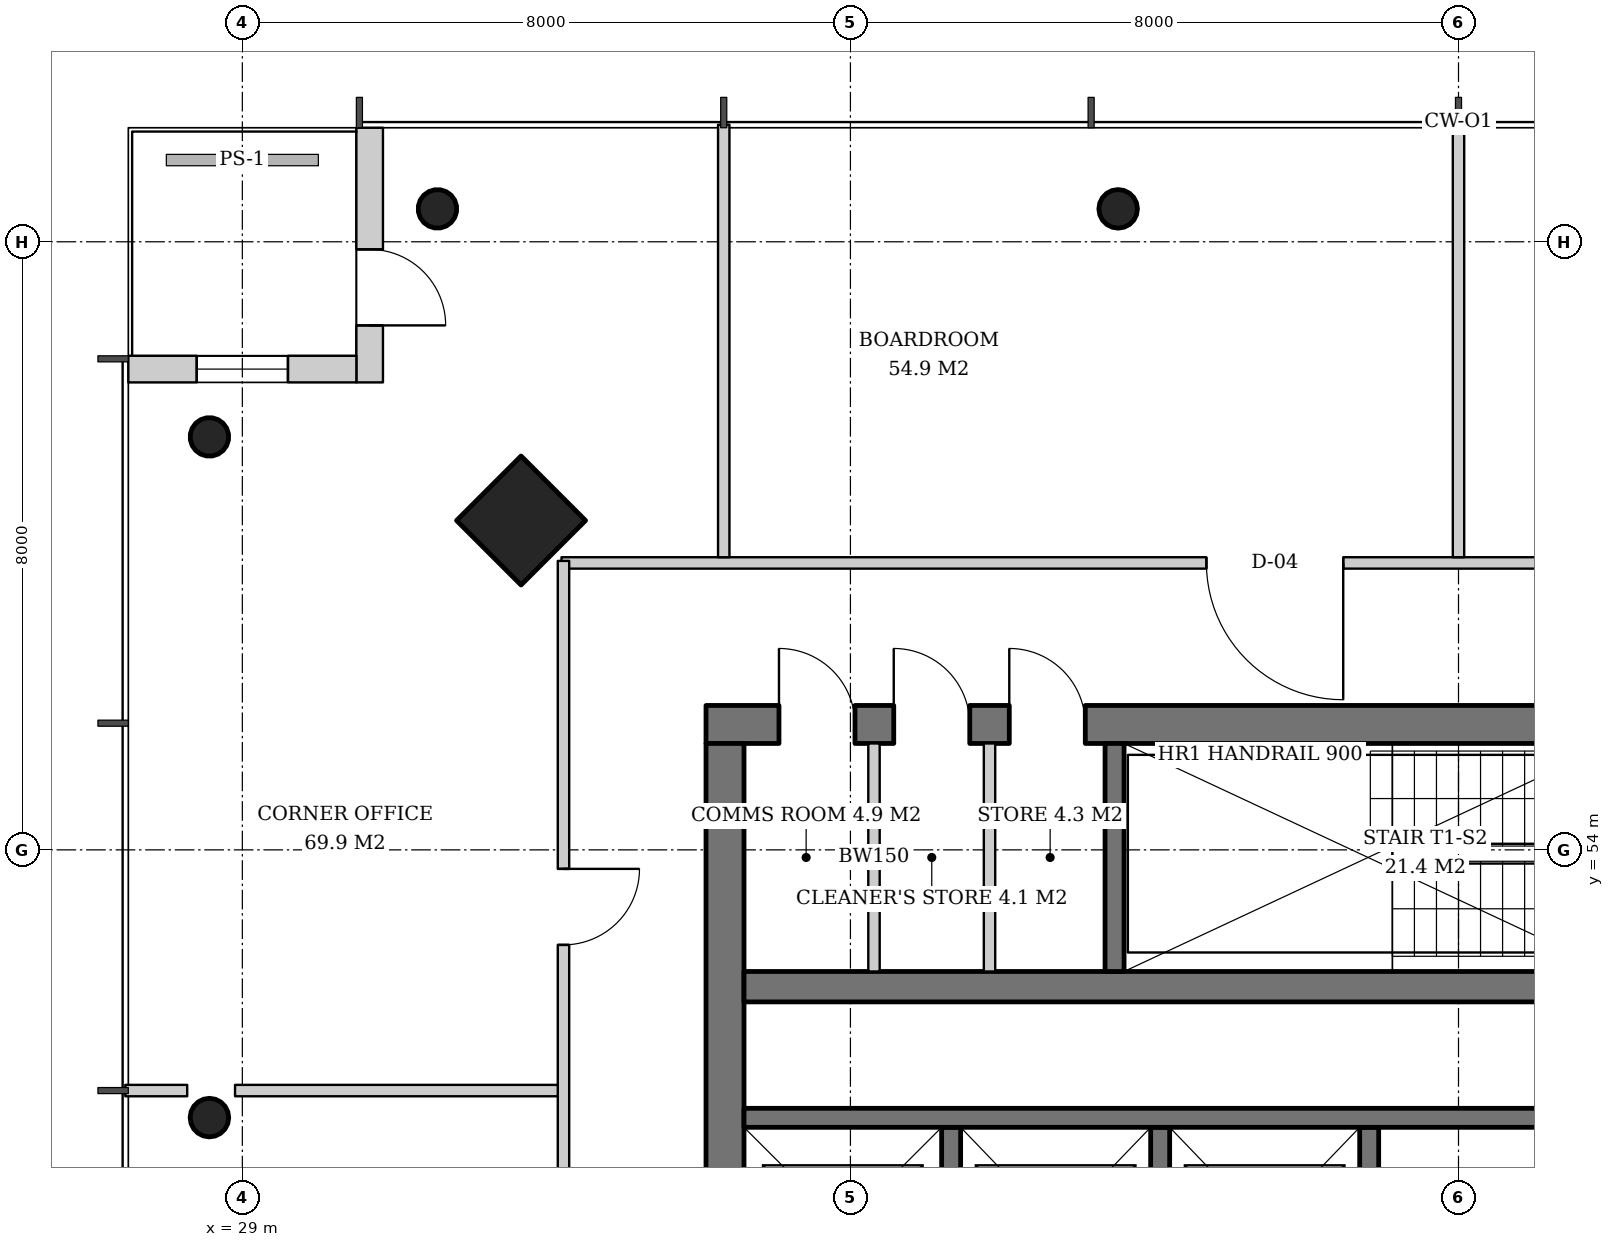
"""IFC4 building model, lengths in metres.
Left out: names, types, materials, properties, quantities, classifications, styles, units other than length and angle.
Written with IfcOpenShell. Run it as: python <this file> out.ifc"""

import sys

from ifc_helpers import new_model, si_unit, direction, frame, frame_2d, origin, origin_2d, place, context, subcontext, project, spatial, rectangle, hollow_circle, extrude, element, fill, save


model = new_model("IFC4")
c1 = context("Model", 3, precision=1e-05, world=origin(), true_north=direction((0.0, 1.0)))
c2 = subcontext(c1, "Body", "Model", "MODEL_VIEW")
j1 = project(units=[si_unit("LENGTHUNIT", "METRE"), si_unit("PLANEANGLEUNIT", "RADIAN")], contexts=[c1])
p1 = place(None, origin())
s1 = spatial("IfcSite", under=j1, at=p1, CompositionType="ELEMENT")
p2 = place(p1, origin())
s2 = spatial("IfcBuilding", under=s1, at=p2, CompositionType="ELEMENT")
p3 = place(p2, frame((0.0, 0.0, 256.6)))
s3 = spatial("IfcBuildingStorey", under=s2, at=p3, CompositionType="ELEMENT", Elevation=256.6)
p4 = place(p3, frame((32.629, 58.371, 0.0), z_axis=(0.031900153262, -0.031900153262, 0.998981861919), x_axis=(0.707106781187, 0.707106781187, 0.0)))
e1 = element("IfcColumn", 1, at=p4, inside=s3, PredefinedType="COLUMN", context=c2, shape_type="SweptSolid", body=[
    extrude(rectangle(XDim=1.2, YDim=1.2, at=origin_2d()), origin(), (0.0, 0.0, 1.0), 3.804),
])
p5 = place(p3, frame((31.529, 62.471, 0.0), z_axis=(0.031900153262, -0.031900153262, 0.998981861919), x_axis=(0.707106781187, 0.707106781187, 0.0)))
e2 = element("IfcColumn", 2, at=p5, inside=s3, PredefinedType="COLUMN", context=c2, shape_type="SweptSolid", body=[
    extrude(hollow_circle(Radius=0.254, WallThickness=0.02, at=origin_2d()), origin(), (0.0, 0.0, 1.0), 3.804),
])
p6 = place(p3, frame((40.51, 62.471, 0.0), z_axis=(0.010659599298, -0.031914583439, 0.999433755837), x_axis=(0.948492281772, 0.316800238982, 0.0)))
e3 = element("IfcColumn", 3, at=p6, inside=s3, PredefinedType="COLUMN", context=c2, shape_type="SweptSolid", body=[
    extrude(hollow_circle(Radius=0.254, WallThickness=0.02, at=origin_2d()), origin(), (0.0, 0.0, 1.0), 3.802),
])
p7 = place(p3, frame((28.529, 59.471, 0.0), z_axis=(0.031900153262, -0.031900153262, 0.998981861919), x_axis=(0.707106781187, 0.707106781187, 0.0)))
e4 = element("IfcColumn", 4, at=p7, inside=s3, PredefinedType="COLUMN", context=c2, shape_type="SweptSolid", body=[
    extrude(hollow_circle(Radius=0.254, WallThickness=0.02, at=origin_2d()), origin(), (0.0, 0.0, 1.0), 3.804),
])
p8 = place(p3, frame((28.529, 50.49, 0.0), z_axis=(0.031914583439, -0.010659599298, 0.999433755837), x_axis=(0.316800238982, 0.948492281772, 0.0)))
e5 = element("IfcColumn", 5, at=p8, inside=s3, PredefinedType="COLUMN", context=c2, shape_type="SweptSolid", body=[
    extrude(hollow_circle(Radius=0.254, WallThickness=0.02, at=origin_2d()), origin(), (0.0, 0.0, 1.0), 3.802),
])
p9 = place(p3, frame((35.1, 55.65, 0.0), z_axis=(0.0, 0.0, 1.0), x_axis=(1.0, 0.0, 0.0)))
e6 = element("IfcWall", 6, at=p9, inside=s3, PredefinedType="SHEAR", context=c2, shape_type="SweptSolid", body=[
    extrude(rectangle(XDim=19.8, YDim=0.5, at=frame_2d((9.9, 0.0))), origin(), (0.0, 0.0, 1.0), 3.8),
])
p10 = place(p9, frame((14.54, 0.0, 0.0)))
e7 = element("IfcOpeningElement", 7, at=p10, cuts=e6, PredefinedType="OPENING", context=c2, shape_type="SweptSolid", body=[
    extrude(rectangle(XDim=1.0, YDim=2.1, at=frame_2d((0.5, 1.05))), frame((0.0, 0.26, 0.0), z_axis=(0.0, -1.0, 0.0), x_axis=(1.0, 0.0, 0.0)), (0.0, 0.0, 1.0), 0.52),
])
p11 = place(p9, frame((0.96, 0.0, 0.0)))
e8 = element("IfcOpeningElement", 8, at=p11, cuts=e6, PredefinedType="OPENING", context=c2, shape_type="SweptSolid", body=[
    extrude(rectangle(XDim=1.0, YDim=2.1, at=frame_2d((0.5, 1.05))), frame((0.0, 0.26, 0.0), z_axis=(0.0, -1.0, 0.0), x_axis=(1.0, 0.0, 0.0)), (0.0, 0.0, 1.0), 0.52),
])
p12 = place(p9, frame((2.47, 0.0, 0.0)))
e9 = element("IfcOpeningElement", 9, at=p12, cuts=e6, PredefinedType="OPENING", context=c2, shape_type="SweptSolid", body=[
    extrude(rectangle(XDim=1.0, YDim=2.1, at=frame_2d((0.5, 1.05))), frame((0.0, 0.26, 0.0), z_axis=(0.0, -1.0, 0.0), x_axis=(1.0, 0.0, 0.0)), (0.0, 0.0, 1.0), 0.52),
])
p13 = place(p9, frame((3.99, 0.0, 0.0)))
e10 = element("IfcOpeningElement", 10, at=p13, cuts=e6, PredefinedType="OPENING", context=c2, shape_type="SweptSolid", body=[
    extrude(rectangle(XDim=1.0, YDim=2.1, at=frame_2d((0.5, 1.05))), frame((0.0, 0.26, 0.0), z_axis=(0.0, -1.0, 0.0), x_axis=(1.0, 0.0, 0.0)), (0.0, 0.0, 1.0), 0.52),
])
p14 = place(p3, frame((35.35, 36.6, 0.0), z_axis=(0.0, 0.0, 1.0), x_axis=(0.0, 1.0, 0.0)))
e11 = element("IfcWall", 11, at=p14, inside=s3, PredefinedType="SHEAR", context=c2, shape_type="SweptSolid", body=[
    extrude(rectangle(XDim=18.8, YDim=0.5, at=frame_2d((9.4, 0.0))), origin(), (0.0, 0.0, 1.0), 3.8),
])
p15 = place(p14, frame((8.5, 0.0, 0.0)))
e12 = element("IfcOpeningElement", 12, at=p15, cuts=e11, PredefinedType="OPENING", context=c2, shape_type="SweptSolid", body=[
    extrude(rectangle(XDim=1.8, YDim=2.4, at=frame_2d((0.9, 1.2))), frame((0.0, 0.26, 0.0), z_axis=(0.0, -1.0, 0.0), x_axis=(1.0, 0.0, 0.0)), (0.0, 0.0, 1.0), 0.52),
])
p16 = place(p3, frame((35.6, 52.2, 0.0), z_axis=(0.0, 0.0, 1.0), x_axis=(1.0, 0.0, 0.0)))
e13 = element("IfcWall", 13, at=p16, inside=s3, PredefinedType="SHEAR", context=c2, shape_type="SweptSolid", body=[
    extrude(rectangle(XDim=18.8, YDim=0.4, at=frame_2d((9.4, 0.0))), origin(), (0.0, 0.0, 1.0), 3.8),
])
p17 = place(p3, frame((30.675, 63.5, 0.0), z_axis=(0.0, 0.0, 1.0), x_axis=(0.0, -1.0, 0.0)))
e14 = element("IfcWall", 14, at=p17, inside=s3, PredefinedType="SOLIDWALL", context=c2, shape_type="SweptSolid", body=[
    extrude(rectangle(XDim=3.35, YDim=0.35, at=frame_2d((1.675, 0.0))), origin(), (0.0, 0.0, 1.0), 3.62),
])
p18 = place(p17, frame((1.6, 0.0, 0.0)))
e15 = element("IfcOpeningElement", 15, at=p18, cuts=e14, PredefinedType="OPENING", context=c2, shape_type="SweptSolid", body=[
    extrude(rectangle(XDim=1.0, YDim=2.4, at=frame_2d((0.5, 1.2))), frame((0.0, 0.185, 0.0), z_axis=(0.0, -1.0, 0.0), x_axis=(1.0, 0.0, 0.0)), (0.0, 0.0, 1.0), 0.37),
])
p19 = place(p3, frame((30.5, 60.325, 0.0), z_axis=(0.0, 0.0, 1.0), x_axis=(-1.0, 0.0, 0.0)))
e16 = element("IfcWall", 16, at=p19, inside=s3, PredefinedType="SOLIDWALL", context=c2, shape_type="SweptSolid", body=[
    extrude(rectangle(XDim=3.0, YDim=0.35, at=frame_2d((1.5, 0.0))), origin(), (0.0, 0.0, 1.0), 3.62),
])
p20 = place(p19, frame((0.9, 0.0, 0.6)))
e17 = element("IfcOpeningElement", 17, at=p20, cuts=e16, PredefinedType="OPENING", context=c2, shape_type="SweptSolid", body=[
    extrude(rectangle(XDim=1.2, YDim=2.55, at=frame_2d((0.6, 1.275))), frame((0.0, 0.185, 0.0), z_axis=(0.0, -1.0, 0.0), x_axis=(1.0, 0.0, 0.0)), (0.0, 0.0, 1.0), 0.37),
])
p21 = place(p3, frame((40.475, 52.4, 0.0), z_axis=(0.0, 0.0, 1.0), x_axis=(0.0, 1.0, 0.0)))
e18 = element("IfcWall", 18, at=p21, inside=s3, PredefinedType="SHEAR", context=c2, shape_type="SweptSolid", body=[
    extrude(rectangle(XDim=3.0, YDim=0.25, at=frame_2d((1.5, 0.0))), origin(), (0.0, 0.0, 1.0), 3.8),
])
for number, where, z_axis, x_axis in (
    (19, (38.325, 47.75, 0.0), (0.0, 0.0, 1.0), (0.0, 1.0, 0.0)),
    (20, (41.075, 47.75, 0.0), (0.0, 0.0, 1.0), (0.0, 1.0, 0.0)),
    (21, (43.825, 47.75, 0.0), (0.0, 0.0, 1.0), (0.0, 1.0, 0.0)),
):
    element("IfcWall", number, at=place(p3, frame(where, z_axis=z_axis, x_axis=x_axis)), inside=s3, PredefinedType="SHEAR", context=c2, shape_type="SweptSolid", body=[
        extrude(rectangle(XDim=2.6, YDim=0.25, at=frame_2d((1.3, 0.0))), origin(), (0.0, 0.0, 1.0), 3.8),
    ])
p22 = place(p3, frame((35.6, 50.475, 0.0), z_axis=(0.0, 0.0, 1.0), x_axis=(1.0, 0.0, 0.0)))
e22 = element("IfcWall", 22, at=p22, inside=s3, PredefinedType="SHEAR", context=c2, shape_type="SweptSolid", body=[
    extrude(rectangle(XDim=11.1, YDim=0.25, at=frame_2d((5.55, 0.0))), origin(), (0.0, 0.0, 1.0), 3.8),
])
for number, where, z_axis, x_axis in (
    (23, (37.31, 52.4, 0.0), (0.0, 0.0, 1.0), (0.0, 1.0, 0.0)),
    (24, (38.83, 52.4, 0.0), (0.0, 0.0, 1.0), (0.0, 1.0, 0.0)),
):
    element("IfcWall", number, at=place(p3, frame(where, z_axis=z_axis, x_axis=x_axis)), inside=s3, PredefinedType="SOLIDWALL", context=c2, shape_type="SweptSolid", body=[
        extrude(rectangle(XDim=3.0, YDim=0.15, at=frame_2d((1.5, 0.0))), origin(), (0.0, 0.0, 1.0), 3.62),
    ])
p23 = place(p3, frame((56.802, 57.775, 0.0), z_axis=(0.0, 0.0, 1.0), x_axis=(-1.0, 0.0, 0.0)))
e25 = element("IfcWall", 25, at=p23, inside=s3, PredefinedType="PARTITIONING", context=c2, shape_type="SweptSolid", body=[
    extrude(rectangle(XDim=23.603, YDim=0.15, at=frame_2d((11.802, 0.0))), origin(), (0.0, 0.0, 1.0), 3.02),
])
p24 = place(p23, frame((4.052, 0.0, 0.0)))
e26 = element("IfcOpeningElement", 26, at=p24, cuts=e25, PredefinedType="OPENING", context=c2, shape_type="SweptSolid", body=[
    extrude(rectangle(XDim=1.0, YDim=2.1, at=frame_2d((0.5, 1.05))), frame((0.0, 0.085, 0.0), z_axis=(0.0, -1.0, 0.0), x_axis=(1.0, 0.0, 0.0)), (0.0, 0.0, 1.0), 0.17),
])
p25 = place(p23, frame((8.885, 0.0, 0.0)))
e27 = element("IfcOpeningElement", 27, at=p25, cuts=e25, PredefinedType="OPENING", context=c2, shape_type="SweptSolid", body=[
    extrude(rectangle(XDim=1.0, YDim=2.1, at=frame_2d((0.5, 1.05))), frame((0.0, 0.085, 0.0), z_axis=(0.0, -1.0, 0.0), x_axis=(1.0, 0.0, 0.0)), (0.0, 0.0, 1.0), 0.17),
])
p26 = place(p23, frame((13.318, 0.0, 0.0)))
e28 = element("IfcOpeningElement", 28, at=p26, cuts=e25, PredefinedType="OPENING", context=c2, shape_type="SweptSolid", body=[
    extrude(rectangle(XDim=1.8, YDim=2.4, at=frame_2d((0.9, 1.2))), frame((0.0, 0.085, 0.0), z_axis=(0.0, -1.0, 0.0), x_axis=(1.0, 0.0, 0.0)), (0.0, 0.0, 1.0), 0.17),
])
for number, where, z_axis, x_axis in (
    (29, (45.0, 57.85, 0.0), (0.0, 0.0, 1.0), (0.0, 1.0, 0.0)),
    (30, (35.333, 57.85, 0.0), (0.0, 0.0, 1.0), (0.0, 1.0, 0.0)),
):
    element("IfcWall", number, at=place(p3, frame(where, z_axis=z_axis, x_axis=x_axis)), inside=s3, PredefinedType="PARTITIONING", context=c2, shape_type="SweptSolid", body=[
        extrude(rectangle(XDim=5.69, YDim=0.15, at=frame_2d((2.845, 0.0))), origin(), (0.0, 0.0, 1.0), 3.12),
    ])
p27 = place(p3, frame((33.225, 57.802, 0.0), z_axis=(0.0, 0.0, 1.0), x_axis=(0.0, -1.0, 0.0)))
e31 = element("IfcWall", 31, at=p27, inside=s3, PredefinedType="PARTITIONING", context=c2, shape_type="SweptSolid", body=[
    extrude(rectangle(XDim=23.603, YDim=0.15, at=frame_2d((11.802, 0.0))), origin(), (0.0, 0.0, 1.0), 3.02),
])
p28 = place(p27, frame((4.052, 0.0, 0.0)))
e32 = element("IfcOpeningElement", 32, at=p28, cuts=e31, PredefinedType="OPENING", context=c2, shape_type="SweptSolid", body=[
    extrude(rectangle(XDim=1.0, YDim=2.1, at=frame_2d((0.5, 1.05))), frame((0.0, 0.085, 0.0), z_axis=(0.0, -1.0, 0.0), x_axis=(1.0, 0.0, 0.0)), (0.0, 0.0, 1.0), 0.17),
])
p29 = place(p27, frame((8.985, 0.0, 0.0)))
e33 = element("IfcOpeningElement", 33, at=p29, cuts=e31, PredefinedType="OPENING", context=c2, shape_type="SweptSolid", body=[
    extrude(rectangle(XDim=0.8, YDim=2.1, at=frame_2d((0.4, 1.05))), frame((0.0, 0.085, 0.0), z_axis=(0.0, -1.0, 0.0), x_axis=(1.0, 0.0, 0.0)), (0.0, 0.0, 1.0), 0.17),
])
p30 = place(p27, frame((13.718, 0.0, 0.0)))
e34 = element("IfcOpeningElement", 34, at=p30, cuts=e31, PredefinedType="OPENING", context=c2, shape_type="SweptSolid", body=[
    extrude(rectangle(XDim=1.0, YDim=2.1, at=frame_2d((0.5, 1.05))), frame((0.0, 0.085, 0.0), z_axis=(0.0, -1.0, 0.0), x_axis=(1.0, 0.0, 0.0)), (0.0, 0.0, 1.0), 0.17),
])
p31 = place(p27, frame((18.651, 0.0, 0.0)))
e35 = element("IfcOpeningElement", 35, at=p31, cuts=e31, PredefinedType="OPENING", context=c2, shape_type="SweptSolid", body=[
    extrude(rectangle(XDim=0.8, YDim=2.1, at=frame_2d((0.4, 1.05))), frame((0.0, 0.085, 0.0), z_axis=(0.0, -1.0, 0.0), x_axis=(1.0, 0.0, 0.0)), (0.0, 0.0, 1.0), 0.17),
])
p32 = place(p3, frame((33.15, 50.833, 0.0), z_axis=(0.0, 0.0, 1.0), x_axis=(-1.0, 0.0, 0.0)))
e36 = element("IfcWall", 36, at=p32, inside=s3, PredefinedType="PARTITIONING", context=c2, shape_type="SweptSolid", body=[
    extrude(rectangle(XDim=4.246, YDim=0.15, at=frame_2d((2.123, 0.0))), origin(), (0.0, 0.0, 1.0), 3.62),
])
p33 = place(p3, frame((28.275, 50.833, 0.0), z_axis=(0.0, 0.0, 1.0), x_axis=(-1.0, 0.0, 0.0)))
e37 = element("IfcWall", 37, at=p33, inside=s3, PredefinedType="PARTITIONING", context=c2, shape_type="SweptSolid", body=[
    extrude(rectangle(XDim=0.815, YDim=0.15, at=frame_2d((0.407, 0.0))), origin(), (0.0, 0.0, 1.0), 3.62),
])
p34 = place(p18, origin())
e38 = element("IfcDoor", 38, at=p34, inside=s3, OperationType="SINGLE_SWING_RIGHT", PredefinedType="DOOR", context=c2, shape_type="SweptSolid", body=[
    extrude(rectangle(XDim=1.0, YDim=2.4, at=frame_2d((0.5, 1.2))), frame((0.0, 0.025, 0.0), z_axis=(0.0, -1.0, 0.0), x_axis=(1.0, 0.0, 0.0)), (0.0, 0.0, 1.0), 0.05),
])
fill(e15, e38)
p35 = place(p20, origin())
e39 = element("IfcWindow", 39, at=p35, inside=s3, PartitioningType="SINGLE_PANEL", PredefinedType="WINDOW", context=c2, shape_type="SweptSolid", body=[
    extrude(rectangle(XDim=1.2, YDim=2.55, at=frame_2d((0.6, 1.275))), frame((0.0, 0.03, 0.0), z_axis=(0.0, -1.0, 0.0), x_axis=(1.0, 0.0, 0.0)), (0.0, 0.0, 1.0), 0.06),
])
fill(e17, e39)
p36 = place(p11, origin())
e40 = element("IfcDoor", 40, at=p36, inside=s3, OperationType="SINGLE_SWING_LEFT", PredefinedType="DOOR", context=c2, shape_type="SweptSolid", body=[
    extrude(rectangle(XDim=1.0, YDim=2.1, at=frame_2d((0.5, 1.05))), frame((0.0, -0.19, 0.0), z_axis=(0.0, -1.0, 0.0), x_axis=(1.0, 0.0, 0.0)), (0.0, 0.0, 1.0), 0.05),
])
fill(e8, e40)
p37 = place(p12, origin())
e41 = element("IfcDoor", 41, at=p37, inside=s3, OperationType="SINGLE_SWING_LEFT", PredefinedType="DOOR", context=c2, shape_type="SweptSolid", body=[
    extrude(rectangle(XDim=1.0, YDim=2.1, at=frame_2d((0.5, 1.05))), frame((0.0, -0.19, 0.0), z_axis=(0.0, -1.0, 0.0), x_axis=(1.0, 0.0, 0.0)), (0.0, 0.0, 1.0), 0.05),
])
fill(e9, e41)
p38 = place(p13, origin())
e42 = element("IfcDoor", 42, at=p38, inside=s3, OperationType="SINGLE_SWING_LEFT", PredefinedType="DOOR", context=c2, shape_type="SweptSolid", body=[
    extrude(rectangle(XDim=1.0, YDim=2.1, at=frame_2d((0.5, 1.05))), frame((0.0, -0.19, 0.0), z_axis=(0.0, -1.0, 0.0), x_axis=(1.0, 0.0, 0.0)), (0.0, 0.0, 1.0), 0.05),
])
fill(e10, e42)
p39 = place(p26, origin())
e43 = element("IfcDoor", 43, at=p39, inside=s3, OperationType="DOUBLE_DOOR_SINGLE_SWING", PredefinedType="DOOR", context=c2, shape_type="SweptSolid", body=[
    extrude(rectangle(XDim=1.8, YDim=2.4, at=frame_2d((0.9, 1.2))), frame((0.0, 0.025, 0.0), z_axis=(0.0, -1.0, 0.0), x_axis=(1.0, 0.0, 0.0)), (0.0, 0.0, 1.0), 0.05),
])
fill(e28, e43)
p40 = place(p28, origin())
e44 = element("IfcDoor", 44, at=p40, inside=s3, OperationType="SINGLE_SWING_LEFT", PredefinedType="DOOR", context=c2, shape_type="SweptSolid", body=[
    extrude(rectangle(XDim=1.0, YDim=2.1, at=frame_2d((0.5, 1.05))), frame((0.0, 0.025, 0.0), z_axis=(0.0, -1.0, 0.0), x_axis=(1.0, 0.0, 0.0)), (0.0, 0.0, 1.0), 0.05),
])
fill(e32, e44)
save(model, sys.argv[1])
